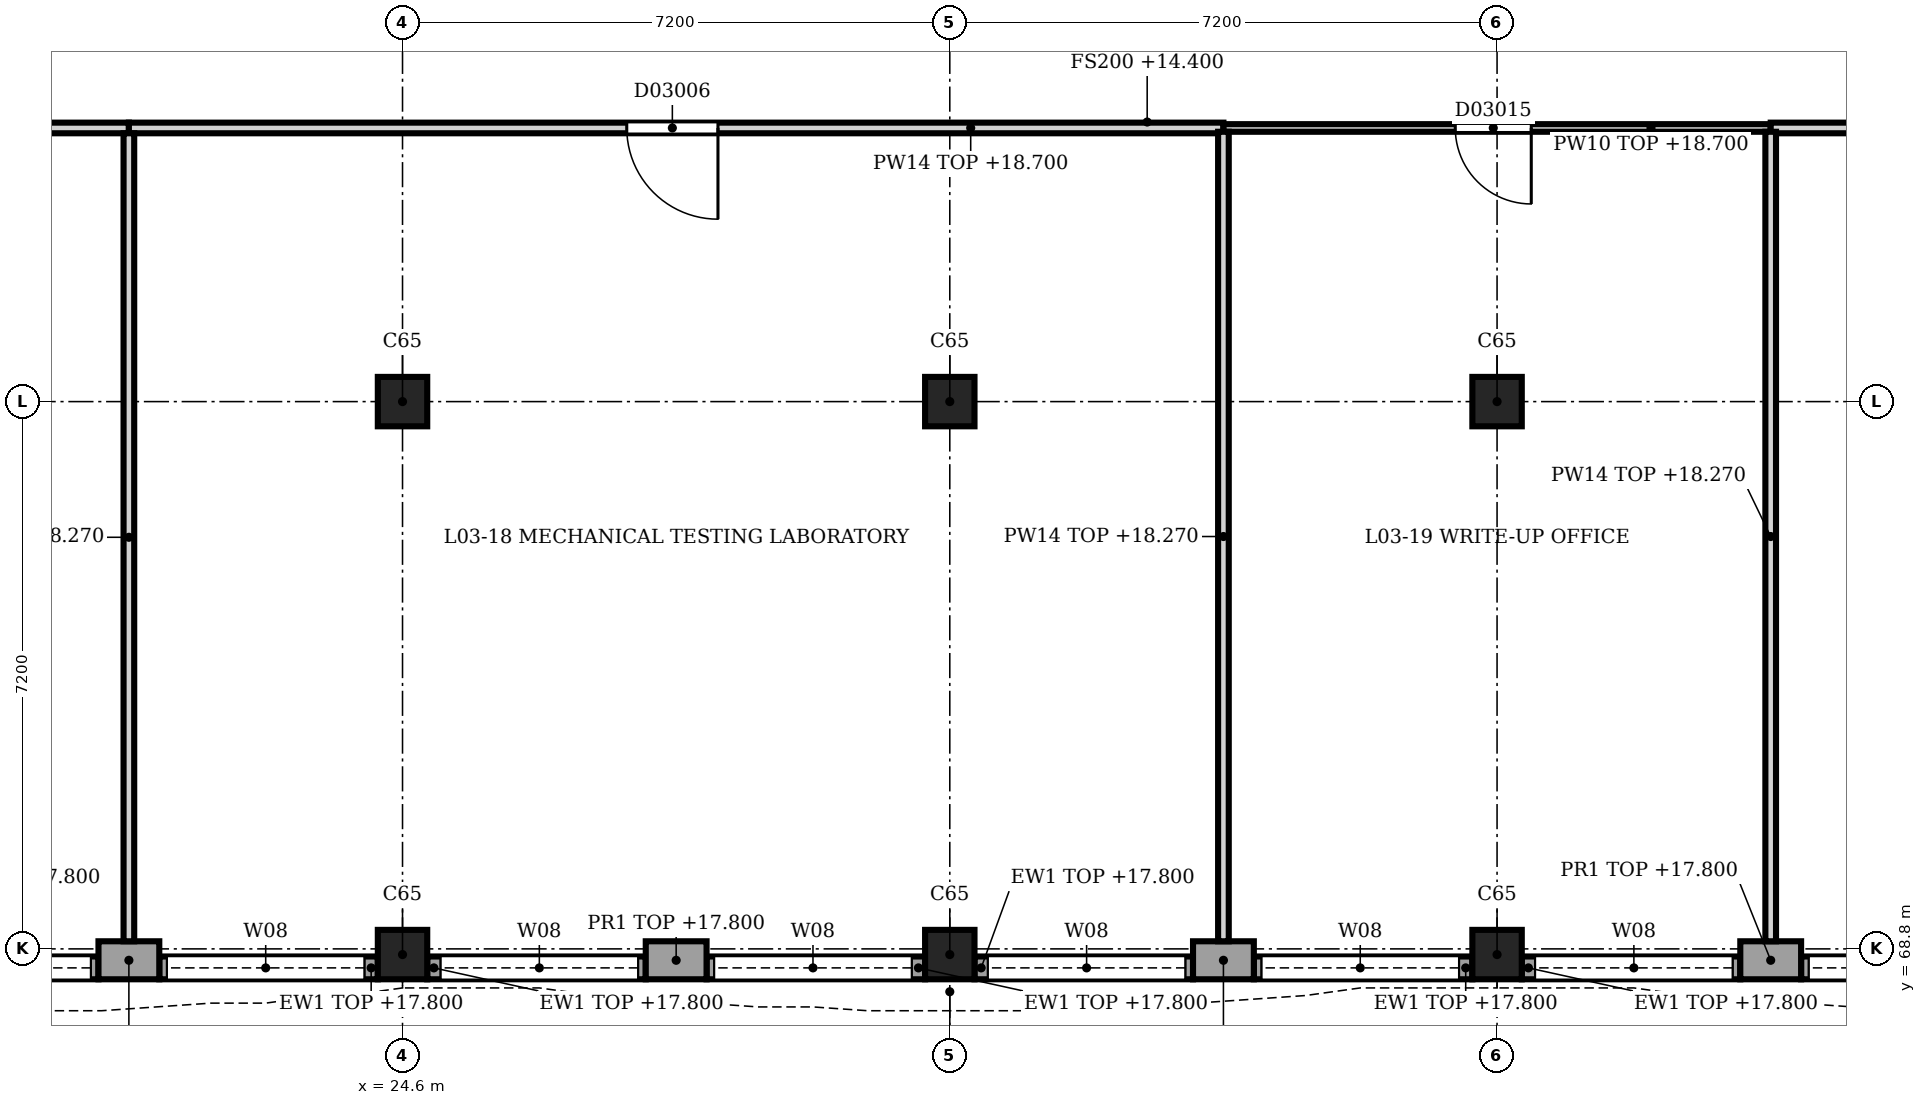
"""IFC4 building model, lengths in metres.
Left out: names, types, materials, properties, quantities, classifications, styles, units other than length and angle.
Written with IfcOpenShell. Run it as: python <this file> out.ifc"""

import sys

from ifc_helpers import new_model, si_unit, direction, frame, frame_2d, origin, origin_2d, place, context, subcontext, project, spatial, rectangle, extrude, element, fill, save


model = new_model("IFC4")
c1 = context("Model", 3, precision=1e-05, world=origin(), true_north=direction((0.0, 1.0)))
c2 = subcontext(c1, "Body", "Model", "MODEL_VIEW")
j1 = project(units=[si_unit("LENGTHUNIT", "METRE"), si_unit("PLANEANGLEUNIT", "RADIAN")], contexts=[c1])
p1 = place(None, origin())
s1 = spatial("IfcSite", under=j1, at=p1, CompositionType="ELEMENT")
p2 = place(p1, origin())
s2 = spatial("IfcBuilding", under=s1, at=p2, CompositionType="ELEMENT")
p3 = place(p2, frame((0.0, 0.0, 14.4)))
s3 = spatial("IfcBuildingStorey", under=s2, at=p3, CompositionType="ELEMENT", Elevation=14.4)
for number, where, z_axis, x_axis in (
    (1, (24.6, 68.725, 0.0), (0.0, 0.0, 1.0), (1.0, 0.0, 0.0)),
    (2, (24.6, 76.0, 0.0), (0.0, 0.0, 1.0), (1.0, 0.0, 0.0)),
    (3, (31.8, 68.725, 0.0), (0.0, 0.0, 1.0), (1.0, 0.0, 0.0)),
    (4, (31.8, 76.0, 0.0), (0.0, 0.0, 1.0), (1.0, 0.0, 0.0)),
    (5, (39.0, 68.725, 0.0), (0.0, 0.0, 1.0), (1.0, 0.0, 0.0)),
    (6, (39.0, 76.0, 0.0), (0.0, 0.0, 1.0), (1.0, 0.0, 0.0)),
):
    element("IfcColumn", number, at=place(p3, frame(where, z_axis=z_axis, x_axis=x_axis)), inside=s3, PredefinedType="COLUMN", context=c2, shape_type="SweptSolid", body=[
        extrude(rectangle(XDim=0.65, YDim=0.65, at=origin_2d()), origin(), (0.0, 0.0, 1.0), 4.5),
    ])
for number, where, z_axis, x_axis in (
    (7, (43.0, 68.65, 0.0), (0.0, 0.0, 1.0), (-1.0, 0.0, 0.0)),
    (8, (35.8, 68.65, 0.0), (0.0, 0.0, 1.0), (-1.0, 0.0, 0.0)),
    (9, (28.6, 68.65, 0.0), (0.0, 0.0, 1.0), (-1.0, 0.0, 0.0)),
):
    element("IfcWall", number, at=place(p3, frame(where, z_axis=z_axis, x_axis=x_axis)), inside=s3, PredefinedType="SOLIDWALL", context=c2, shape_type="SweptSolid", body=[
        extrude(rectangle(XDim=0.8, YDim=0.5, at=frame_2d((0.4, 0.0))), origin(), (0.0, 0.0, 1.0), 3.4),
    ])
p4 = place(p3, frame((21.4, 68.65, 0.0), z_axis=(0.0, 0.0, 1.0), x_axis=(-1.0, 0.0, 0.0)))
e10 = element("IfcWall", 10, at=p4, inside=s3, PredefinedType="SOLIDWALL", context=c2, shape_type="SweptSolid", body=[
    extrude(rectangle(XDim=0.8, YDim=0.5, at=frame_2d((0.4, 0.0))), origin(), (0.0, 0.0, 1.0), 3.4),
])
p5 = place(p3, frame((45.875, 68.55, 0.0), z_axis=(0.0, 0.0, 1.0), x_axis=(-1.0, 0.0, 0.0)))
e11 = element("IfcWall", 11, at=p5, inside=s3, PredefinedType="SOLIDWALL", context=c2, shape_type="SweptSolid", body=[
    extrude(rectangle(XDim=2.875, YDim=0.3, at=frame_2d((1.438, 0.0))), origin(), (0.0, 0.0, 1.0), 3.4),
])
p6 = place(p5, frame((0.175, 0.0, 1.2)))
e12 = element("IfcOpeningElement", 12, at=p6, cuts=e11, PredefinedType="OPENING", context=c2, shape_type="SweptSolid", body=[
    extrude(rectangle(XDim=2.6, YDim=2.1, at=frame_2d((1.3, 1.05))), frame((0.0, 0.16, 0.0), z_axis=(0.0, -1.0, 0.0), x_axis=(1.0, 0.0, 0.0)), (0.0, 0.0, 1.0), 0.32),
])
p7 = place(p3, frame((42.2, 68.55, 0.0), z_axis=(0.0, 0.0, 1.0), x_axis=(-1.0, 0.0, 0.0)))
e13 = element("IfcWall", 13, at=p7, inside=s3, PredefinedType="SOLIDWALL", context=c2, shape_type="SweptSolid", body=[
    extrude(rectangle(XDim=2.875, YDim=0.3, at=frame_2d((1.438, 0.0))), origin(), (0.0, 0.0, 1.0), 3.4),
])
p8 = place(p7, frame((0.1, 0.0, 1.2)))
e14 = element("IfcOpeningElement", 14, at=p8, cuts=e13, PredefinedType="OPENING", context=c2, shape_type="SweptSolid", body=[
    extrude(rectangle(XDim=2.6, YDim=2.1, at=frame_2d((1.3, 1.05))), frame((0.0, 0.16, 0.0), z_axis=(0.0, -1.0, 0.0), x_axis=(1.0, 0.0, 0.0)), (0.0, 0.0, 1.0), 0.32),
])
p9 = place(p3, frame((38.675, 68.55, 0.0), z_axis=(0.0, 0.0, 1.0), x_axis=(-1.0, 0.0, 0.0)))
e15 = element("IfcWall", 15, at=p9, inside=s3, PredefinedType="SOLIDWALL", context=c2, shape_type="SweptSolid", body=[
    extrude(rectangle(XDim=2.875, YDim=0.3, at=frame_2d((1.438, 0.0))), origin(), (0.0, 0.0, 1.0), 3.4),
])
p10 = place(p9, frame((0.175, 0.0, 1.2)))
e16 = element("IfcOpeningElement", 16, at=p10, cuts=e15, PredefinedType="OPENING", context=c2, shape_type="SweptSolid", body=[
    extrude(rectangle(XDim=2.6, YDim=2.1, at=frame_2d((1.3, 1.05))), frame((0.0, 0.16, 0.0), z_axis=(0.0, -1.0, 0.0), x_axis=(1.0, 0.0, 0.0)), (0.0, 0.0, 1.0), 0.32),
])
p11 = place(p3, frame((35.0, 68.55, 0.0), z_axis=(0.0, 0.0, 1.0), x_axis=(-1.0, 0.0, 0.0)))
e17 = element("IfcWall", 17, at=p11, inside=s3, PredefinedType="SOLIDWALL", context=c2, shape_type="SweptSolid", body=[
    extrude(rectangle(XDim=2.875, YDim=0.3, at=frame_2d((1.438, 0.0))), origin(), (0.0, 0.0, 1.0), 3.4),
])
p12 = place(p11, frame((0.1, 0.0, 1.2)))
e18 = element("IfcOpeningElement", 18, at=p12, cuts=e17, PredefinedType="OPENING", context=c2, shape_type="SweptSolid", body=[
    extrude(rectangle(XDim=2.6, YDim=2.1, at=frame_2d((1.3, 1.05))), frame((0.0, 0.16, 0.0), z_axis=(0.0, -1.0, 0.0), x_axis=(1.0, 0.0, 0.0)), (0.0, 0.0, 1.0), 0.32),
])
p13 = place(p3, frame((31.475, 68.55, 0.0), z_axis=(0.0, 0.0, 1.0), x_axis=(-1.0, 0.0, 0.0)))
e19 = element("IfcWall", 19, at=p13, inside=s3, PredefinedType="SOLIDWALL", context=c2, shape_type="SweptSolid", body=[
    extrude(rectangle(XDim=2.875, YDim=0.3, at=frame_2d((1.438, 0.0))), origin(), (0.0, 0.0, 1.0), 3.4),
])
p14 = place(p13, frame((0.175, 0.0, 1.2)))
e20 = element("IfcOpeningElement", 20, at=p14, cuts=e19, PredefinedType="OPENING", context=c2, shape_type="SweptSolid", body=[
    extrude(rectangle(XDim=2.6, YDim=2.1, at=frame_2d((1.3, 1.05))), frame((0.0, 0.16, 0.0), z_axis=(0.0, -1.0, 0.0), x_axis=(1.0, 0.0, 0.0)), (0.0, 0.0, 1.0), 0.32),
])
p15 = place(p3, frame((27.8, 68.55, 0.0), z_axis=(0.0, 0.0, 1.0), x_axis=(-1.0, 0.0, 0.0)))
e21 = element("IfcWall", 21, at=p15, inside=s3, PredefinedType="SOLIDWALL", context=c2, shape_type="SweptSolid", body=[
    extrude(rectangle(XDim=2.875, YDim=0.3, at=frame_2d((1.438, 0.0))), origin(), (0.0, 0.0, 1.0), 3.4),
])
p16 = place(p15, frame((0.1, 0.0, 1.2)))
e22 = element("IfcOpeningElement", 22, at=p16, cuts=e21, PredefinedType="OPENING", context=c2, shape_type="SweptSolid", body=[
    extrude(rectangle(XDim=2.6, YDim=2.1, at=frame_2d((1.3, 1.05))), frame((0.0, 0.16, 0.0), z_axis=(0.0, -1.0, 0.0), x_axis=(1.0, 0.0, 0.0)), (0.0, 0.0, 1.0), 0.32),
])
p17 = place(p3, frame((24.275, 68.55, 0.0), z_axis=(0.0, 0.0, 1.0), x_axis=(-1.0, 0.0, 0.0)))
e23 = element("IfcWall", 23, at=p17, inside=s3, PredefinedType="SOLIDWALL", context=c2, shape_type="SweptSolid", body=[
    extrude(rectangle(XDim=2.875, YDim=0.3, at=frame_2d((1.438, 0.0))), origin(), (0.0, 0.0, 1.0), 3.4),
])
p18 = place(p17, frame((0.175, 0.0, 1.2)))
e24 = element("IfcOpeningElement", 24, at=p18, cuts=e23, PredefinedType="OPENING", context=c2, shape_type="SweptSolid", body=[
    extrude(rectangle(XDim=2.6, YDim=2.1, at=frame_2d((1.3, 1.05))), frame((0.0, 0.16, 0.0), z_axis=(0.0, -1.0, 0.0), x_axis=(1.0, 0.0, 0.0)), (0.0, 0.0, 1.0), 0.32),
])
p19 = place(p3, frame((20.6, 68.55, 0.0), z_axis=(0.0, 0.0, 1.0), x_axis=(-1.0, 0.0, 0.0)))
e25 = element("IfcWall", 25, at=p19, inside=s3, PredefinedType="SOLIDWALL", context=c2, shape_type="SweptSolid", body=[
    extrude(rectangle(XDim=2.875, YDim=0.3, at=frame_2d((1.438, 0.0))), origin(), (0.0, 0.0, 1.0), 3.4),
])
p20 = place(p19, frame((0.1, 0.0, 1.2)))
e26 = element("IfcOpeningElement", 26, at=p20, cuts=e25, PredefinedType="OPENING", context=c2, shape_type="SweptSolid", body=[
    extrude(rectangle(XDim=2.6, YDim=2.1, at=frame_2d((1.3, 1.05))), frame((0.0, 0.16, 0.0), z_axis=(0.0, -1.0, 0.0), x_axis=(1.0, 0.0, 0.0)), (0.0, 0.0, 1.0), 0.32),
])
p21 = place(p3, frame((21.0, 79.6, 0.0), z_axis=(0.0, 0.0, 1.0), x_axis=(-1.0, 0.0, 0.0)))
e27 = element("IfcWall", 27, at=p21, inside=s3, PredefinedType="PARTITIONING", context=c2, shape_type="SweptSolid", body=[
    extrude(rectangle(XDim=17.9, YDim=0.14, at=frame_2d((8.95, 0.0))), origin(), (0.0, 0.0, 1.0), 4.3),
])
p22 = place(p21, frame((8.45, 0.0, 0.0)))
e28 = element("IfcOpeningElement", 28, at=p22, cuts=e27, PredefinedType="OPENING", context=c2, shape_type="SweptSolid", body=[
    extrude(rectangle(XDim=1.2, YDim=2.1, at=frame_2d((0.6, 1.05))), frame((0.0, 0.08, 0.0), z_axis=(0.0, -1.0, 0.0), x_axis=(1.0, 0.0, 0.0)), (0.0, 0.0, 1.0), 0.16),
])
p23 = place(p3, frame((35.4, 79.6, 0.0), z_axis=(0.0, 0.0, 1.0), x_axis=(-1.0, 0.0, 0.0)))
e29 = element("IfcWall", 29, at=p23, inside=s3, PredefinedType="PARTITIONING", context=c2, shape_type="SweptSolid", body=[
    extrude(rectangle(XDim=14.4, YDim=0.14, at=frame_2d((7.2, 0.0))), origin(), (0.0, 0.0, 1.0), 4.3),
])
p24 = place(p23, frame((6.65, 0.0, 0.0)))
e30 = element("IfcOpeningElement", 30, at=p24, cuts=e29, PredefinedType="OPENING", context=c2, shape_type="SweptSolid", body=[
    extrude(rectangle(XDim=1.2, YDim=2.1, at=frame_2d((0.6, 1.05))), frame((0.0, 0.08, 0.0), z_axis=(0.0, -1.0, 0.0), x_axis=(1.0, 0.0, 0.0)), (0.0, 0.0, 1.0), 0.16),
])
p25 = place(p3, frame((42.6, 79.6, 0.0), z_axis=(0.0, 0.0, 1.0), x_axis=(-1.0, 0.0, 0.0)))
e31 = element("IfcWall", 31, at=p25, inside=s3, PredefinedType="PARTITIONING", context=c2, shape_type="SweptSolid", body=[
    extrude(rectangle(XDim=7.2, YDim=0.1, at=frame_2d((3.6, 0.0))), origin(), (0.0, 0.0, 1.0), 4.3),
])
p26 = place(p25, frame((3.15, 0.0, 0.0)))
e32 = element("IfcOpeningElement", 32, at=p26, cuts=e31, PredefinedType="OPENING", context=c2, shape_type="SweptSolid", body=[
    extrude(rectangle(XDim=1.0, YDim=2.1, at=frame_2d((0.5, 1.05))), frame((0.0, 0.06, 0.0), z_axis=(0.0, -1.0, 0.0), x_axis=(1.0, 0.0, 0.0)), (0.0, 0.0, 1.0), 0.12),
])
p27 = place(p3, frame((57.0, 79.6, 0.0), z_axis=(0.0, 0.0, 1.0), x_axis=(-1.0, 0.0, 0.0)))
e33 = element("IfcWall", 33, at=p27, inside=s3, PredefinedType="PARTITIONING", context=c2, shape_type="SweptSolid", body=[
    extrude(rectangle(XDim=14.4, YDim=0.14, at=frame_2d((7.2, 0.0))), origin(), (0.0, 0.0, 1.0), 4.3),
])
p28 = place(p27, frame((6.65, 0.0, 0.0)))
e34 = element("IfcOpeningElement", 34, at=p28, cuts=e33, PredefinedType="OPENING", context=c2, shape_type="SweptSolid", body=[
    extrude(rectangle(XDim=1.2, YDim=2.1, at=frame_2d((0.6, 1.05))), frame((0.0, 0.08, 0.0), z_axis=(0.0, -1.0, 0.0), x_axis=(1.0, 0.0, 0.0)), (0.0, 0.0, 1.0), 0.16),
])
p29 = place(p3, frame((21.0, 68.9, 0.0), z_axis=(0.0, 0.0, 1.0), x_axis=(0.0, 1.0, 0.0)))
e35 = element("IfcWall", 35, at=p29, inside=s3, PredefinedType="PARTITIONING", context=c2, shape_type="SweptSolid", body=[
    extrude(rectangle(XDim=10.63, YDim=0.14, at=frame_2d((5.315, 0.0))), origin(), (0.0, 0.0, 1.0), 3.87),
])
for number, where, z_axis, x_axis in (
    (36, (35.4, 68.9, 0.0), (0.0, 0.0, 1.0), (0.0, 1.0, 0.0)),
    (37, (42.6, 68.9, 0.0), (0.0, 0.0, 1.0), (0.0, 1.0, 0.0)),
):
    element("IfcWall", number, at=place(p3, frame(where, z_axis=z_axis, x_axis=x_axis)), inside=s3, PredefinedType="PARTITIONING", context=c2, shape_type="SweptSolid", body=[
        extrude(rectangle(XDim=10.65, YDim=0.14, at=frame_2d((5.325, 0.0))), origin(), (0.0, 0.0, 1.0), 3.87),
    ])
p30 = place(p6, origin())
e38 = element("IfcWindow", 38, at=p30, inside=s3, PartitioningType="SINGLE_PANEL", PredefinedType="WINDOW", context=c2, shape_type="SweptSolid", body=[
    extrude(rectangle(XDim=2.6, YDim=2.1, at=frame_2d((1.3, 1.05))), frame((0.0, 0.03, 0.0), z_axis=(0.0, -1.0, 0.0), x_axis=(1.0, 0.0, 0.0)), (0.0, 0.0, 1.0), 0.06),
])
fill(e12, e38)
p31 = place(p8, origin())
e39 = element("IfcWindow", 39, at=p31, inside=s3, PartitioningType="SINGLE_PANEL", PredefinedType="WINDOW", context=c2, shape_type="SweptSolid", body=[
    extrude(rectangle(XDim=2.6, YDim=2.1, at=frame_2d((1.3, 1.05))), frame((0.0, 0.03, 0.0), z_axis=(0.0, -1.0, 0.0), x_axis=(1.0, 0.0, 0.0)), (0.0, 0.0, 1.0), 0.06),
])
fill(e14, e39)
p32 = place(p10, origin())
e40 = element("IfcWindow", 40, at=p32, inside=s3, PartitioningType="SINGLE_PANEL", PredefinedType="WINDOW", context=c2, shape_type="SweptSolid", body=[
    extrude(rectangle(XDim=2.6, YDim=2.1, at=frame_2d((1.3, 1.05))), frame((0.0, 0.03, 0.0), z_axis=(0.0, -1.0, 0.0), x_axis=(1.0, 0.0, 0.0)), (0.0, 0.0, 1.0), 0.06),
])
fill(e16, e40)
p33 = place(p12, origin())
e41 = element("IfcWindow", 41, at=p33, inside=s3, PartitioningType="SINGLE_PANEL", PredefinedType="WINDOW", context=c2, shape_type="SweptSolid", body=[
    extrude(rectangle(XDim=2.6, YDim=2.1, at=frame_2d((1.3, 1.05))), frame((0.0, 0.03, 0.0), z_axis=(0.0, -1.0, 0.0), x_axis=(1.0, 0.0, 0.0)), (0.0, 0.0, 1.0), 0.06),
])
fill(e18, e41)
p34 = place(p14, origin())
e42 = element("IfcWindow", 42, at=p34, inside=s3, PartitioningType="SINGLE_PANEL", PredefinedType="WINDOW", context=c2, shape_type="SweptSolid", body=[
    extrude(rectangle(XDim=2.6, YDim=2.1, at=frame_2d((1.3, 1.05))), frame((0.0, 0.03, 0.0), z_axis=(0.0, -1.0, 0.0), x_axis=(1.0, 0.0, 0.0)), (0.0, 0.0, 1.0), 0.06),
])
fill(e20, e42)
p35 = place(p16, origin())
e43 = element("IfcWindow", 43, at=p35, inside=s3, PartitioningType="SINGLE_PANEL", PredefinedType="WINDOW", context=c2, shape_type="SweptSolid", body=[
    extrude(rectangle(XDim=2.6, YDim=2.1, at=frame_2d((1.3, 1.05))), frame((0.0, 0.03, 0.0), z_axis=(0.0, -1.0, 0.0), x_axis=(1.0, 0.0, 0.0)), (0.0, 0.0, 1.0), 0.06),
])
fill(e22, e43)
p36 = place(p18, origin())
e44 = element("IfcWindow", 44, at=p36, inside=s3, PartitioningType="SINGLE_PANEL", PredefinedType="WINDOW", context=c2, shape_type="SweptSolid", body=[
    extrude(rectangle(XDim=2.6, YDim=2.1, at=frame_2d((1.3, 1.05))), frame((0.0, 0.03, 0.0), z_axis=(0.0, -1.0, 0.0), x_axis=(1.0, 0.0, 0.0)), (0.0, 0.0, 1.0), 0.06),
])
fill(e24, e44)
p37 = place(p20, origin())
e45 = element("IfcWindow", 45, at=p37, inside=s3, PartitioningType="SINGLE_PANEL", PredefinedType="WINDOW", context=c2, shape_type="SweptSolid", body=[
    extrude(rectangle(XDim=2.6, YDim=2.1, at=frame_2d((1.3, 1.05))), frame((0.0, 0.03, 0.0), z_axis=(0.0, -1.0, 0.0), x_axis=(1.0, 0.0, 0.0)), (0.0, 0.0, 1.0), 0.06),
])
fill(e26, e45)
p38 = place(p24, origin())
e46 = element("IfcDoor", 46, at=p38, inside=s3, OperationType="SINGLE_SWING_RIGHT", PredefinedType="DOOR", context=c2, shape_type="SweptSolid", body=[
    extrude(rectangle(XDim=1.2, YDim=2.1, at=frame_2d((0.6, 1.05))), frame((0.0, 0.025, 0.0), z_axis=(0.0, -1.0, 0.0), x_axis=(1.0, 0.0, 0.0)), (0.0, 0.0, 1.0), 0.05),
])
fill(e30, e46)
p39 = place(p26, origin())
e47 = element("IfcDoor", 47, at=p39, inside=s3, OperationType="SINGLE_SWING_RIGHT", PredefinedType="DOOR", context=c2, shape_type="SweptSolid", body=[
    extrude(rectangle(XDim=1.0, YDim=2.1, at=frame_2d((0.5, 1.05))), frame((0.0, 0.025, 0.0), z_axis=(0.0, -1.0, 0.0), x_axis=(1.0, 0.0, 0.0)), (0.0, 0.0, 1.0), 0.05),
])
fill(e32, e47)
save(model, sys.argv[1])
